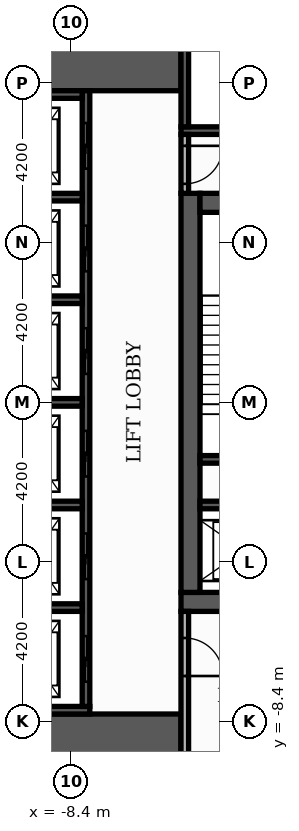
"""IFC4 building model, lengths in metres.
Left out: names, types, materials, properties, quantities, classifications, styles, units other than length and angle.
Written with IfcOpenShell. Run it as: python <this file> out.ifc"""

import sys

from ifc_helpers import new_model, si_unit, direction, frame, frame_2d, origin, place, context, subcontext, project, spatial, rectangle, extrude, element, fill, save


model = new_model("IFC4")
c1 = context("Model", 3, precision=1e-05, world=origin(), true_north=direction((0.0, 1.0)))
c2 = subcontext(c1, "Body", "Model", "MODEL_VIEW")
j1 = project(units=[si_unit("LENGTHUNIT", "METRE"), si_unit("PLANEANGLEUNIT", "RADIAN")], contexts=[c1])
p1 = place(None, origin())
s1 = spatial("IfcSite", under=j1, at=p1, CompositionType="ELEMENT")
p2 = place(p1, origin())
s2 = spatial("IfcBuilding", under=s1, at=p2, CompositionType="ELEMENT")
p3 = place(p2, frame((0.0, 0.0, -4.2)))
s3 = spatial("IfcBuildingStorey", under=s2, at=p3, CompositionType="ELEMENT", Elevation=-4.2)
p4 = place(p3, frame((-5.5, -5.25, 0.0), z_axis=(0.0, 0.0, 1.0), x_axis=(1.0, 0.0, 0.0)))
e1 = element("IfcWall", 1, at=p4, inside=s3, PredefinedType="SHEAR", context=c2, shape_type="SweptSolid", body=[
    extrude(rectangle(XDim=11.0, YDim=0.5, at=frame_2d((5.5, 0.0))), origin(), (0.0, 0.0, 1.0), 3.78),
])
p5 = place(p4, frame((4.9, 0.0, 0.0)))
e2 = element("IfcOpeningElement", 2, at=p5, cuts=e1, PredefinedType="OPENING", context=c2, shape_type="SweptSolid", body=[
    extrude(rectangle(XDim=1.2, YDim=2.1, at=frame_2d((0.6, 1.05))), frame((0.0, 0.26, 0.0), z_axis=(0.0, -1.0, 0.0), x_axis=(1.0, 0.0, 0.0)), (0.0, 0.0, 1.0), 0.52),
])
p6 = place(p3, frame((-5.25, -5.0, 0.0), z_axis=(0.0, 0.0, 1.0), x_axis=(0.0, 1.0, 0.0)))
e3 = element("IfcWall", 3, at=p6, inside=s3, PredefinedType="SHEAR", context=c2, shape_type="SweptSolid", body=[
    extrude(rectangle(XDim=10.5, YDim=0.5, at=frame_2d((5.25, 0.0))), origin(), (0.0, 0.0, 1.0), 3.78),
])
p7 = place(p3, frame((-5.0, 5.25, 0.0), z_axis=(0.0, 0.0, 1.0), x_axis=(1.0, 0.0, 0.0)))
e4 = element("IfcWall", 4, at=p7, inside=s3, PredefinedType="SHEAR", context=c2, shape_type="SweptSolid", body=[
    extrude(rectangle(XDim=10.0, YDim=0.5, at=frame_2d((5.0, 0.0))), origin(), (0.0, 0.0, 1.0), 3.78),
])
p8 = place(p7, frame((4.4, 0.0, 0.0)))
e5 = element("IfcOpeningElement", 5, at=p8, cuts=e4, PredefinedType="OPENING", context=c2, shape_type="SweptSolid", body=[
    extrude(rectangle(XDim=1.2, YDim=2.1, at=frame_2d((0.6, 1.05))), frame((0.0, 0.26, 0.0), z_axis=(0.0, -1.0, 0.0), x_axis=(1.0, 0.0, 0.0)), (0.0, 0.0, 1.0), 0.52),
])
for number, where, z_axis, x_axis in (
    (6, (-10.1, -9.15, 0.0), (0.0, 0.0, 1.0), (1.0, 0.0, 0.0)),
    (7, (-10.1, 9.15, 0.0), (0.0, 0.0, 1.0), (1.0, 0.0, 0.0)),
):
    element("IfcWall", number, at=place(p3, frame(where, z_axis=z_axis, x_axis=x_axis)), inside=s3, PredefinedType="SHEAR", context=c2, shape_type="SweptSolid", body=[
        extrude(rectangle(XDim=4.6, YDim=1.9, at=frame_2d((2.3, 0.0))), origin(), (0.0, 0.0, 1.0), 3.78),
    ])
p9 = place(p3, frame((-5.0, -1.5, 0.0), z_axis=(0.0, 0.0, 1.0), x_axis=(1.0, 0.0, 0.0)))
e8 = element("IfcWall", 8, at=p9, inside=s3, PredefinedType="SHEAR", context=c2, shape_type="SweptSolid", body=[
    extrude(rectangle(XDim=3.05, YDim=0.2, at=frame_2d((1.525, 0.0))), origin(), (0.0, 0.0, 1.0), 3.78),
])
p10 = place(p3, frame((-5.5, 7.15, 0.0), z_axis=(0.0, 0.0, 1.0), x_axis=(1.0, 0.0, 0.0)))
e9 = element("IfcWall", 9, at=p10, inside=s3, PredefinedType="SHEAR", context=c2, shape_type="SweptSolid", body=[
    extrude(rectangle(XDim=6.8, YDim=0.2, at=frame_2d((3.4, 0.0))), origin(), (0.0, 0.0, 1.0), 3.78),
])
p11 = place(p3, frame((-5.4, 7.25, 0.0), z_axis=(0.0, 0.0, 1.0), x_axis=(0.0, 1.0, 0.0)))
e10 = element("IfcWall", 10, at=p11, inside=s3, PredefinedType="SHEAR", context=c2, shape_type="SweptSolid", body=[
    extrude(rectangle(XDim=2.85, YDim=0.2, at=frame_2d((1.425, 0.0))), origin(), (0.0, 0.0, 1.0), 3.78),
])
p12 = place(p3, frame((-10.1, -8.1, 0.0), z_axis=(0.0, 0.0, 1.0), x_axis=(1.0, 0.0, 0.0)))
e11 = element("IfcWall", 11, at=p12, inside=s3, PredefinedType="SHEAR", context=c2, shape_type="SweptSolid", body=[
    extrude(rectangle(XDim=2.2, YDim=0.2, at=frame_2d((1.1, 0.0))), origin(), (0.0, 0.0, 1.0), 3.78),
])
p13 = place(p3, frame((-8.0, -8.0, 0.0), z_axis=(0.0, 0.0, 1.0), x_axis=(0.0, 1.0, 0.0)))
e12 = element("IfcWall", 12, at=p13, inside=s3, PredefinedType="SHEAR", context=c2, shape_type="SweptSolid", body=[
    extrude(rectangle(XDim=16.2, YDim=0.2, at=frame_2d((8.1, 0.0))), origin(), (0.0, 0.0, 1.0), 3.78),
])
p14 = place(p13, frame((0.65, 0.0, 0.0)))
e13 = element("IfcOpeningElement", 13, at=p14, cuts=e12, PredefinedType="OPENING", context=c2, shape_type="SweptSolid", body=[
    extrude(rectangle(XDim=1.2, YDim=2.1, at=frame_2d((0.6, 1.05))), frame((0.0, 0.11, 0.0), z_axis=(0.0, -1.0, 0.0), x_axis=(1.0, 0.0, 0.0)), (0.0, 0.0, 1.0), 0.22),
])
p15 = place(p13, frame((3.35, 0.0, 0.0)))
e14 = element("IfcOpeningElement", 14, at=p15, cuts=e12, PredefinedType="OPENING", context=c2, shape_type="SweptSolid", body=[
    extrude(rectangle(XDim=1.2, YDim=2.1, at=frame_2d((0.6, 1.05))), frame((0.0, 0.11, 0.0), z_axis=(0.0, -1.0, 0.0), x_axis=(1.0, 0.0, 0.0)), (0.0, 0.0, 1.0), 0.22),
])
p16 = place(p13, frame((6.05, 0.0, 0.0)))
e15 = element("IfcOpeningElement", 15, at=p16, cuts=e12, PredefinedType="OPENING", context=c2, shape_type="SweptSolid", body=[
    extrude(rectangle(XDim=1.2, YDim=2.1, at=frame_2d((0.6, 1.05))), frame((0.0, 0.11, 0.0), z_axis=(0.0, -1.0, 0.0), x_axis=(1.0, 0.0, 0.0)), (0.0, 0.0, 1.0), 0.22),
])
p17 = place(p13, frame((8.75, 0.0, 0.0)))
e16 = element("IfcOpeningElement", 16, at=p17, cuts=e12, PredefinedType="OPENING", context=c2, shape_type="SweptSolid", body=[
    extrude(rectangle(XDim=1.2, YDim=2.1, at=frame_2d((0.6, 1.05))), frame((0.0, 0.11, 0.0), z_axis=(0.0, -1.0, 0.0), x_axis=(1.0, 0.0, 0.0)), (0.0, 0.0, 1.0), 0.22),
])
p18 = place(p13, frame((11.45, 0.0, 0.0)))
e17 = element("IfcOpeningElement", 17, at=p18, cuts=e12, PredefinedType="OPENING", context=c2, shape_type="SweptSolid", body=[
    extrude(rectangle(XDim=1.2, YDim=2.1, at=frame_2d((0.6, 1.05))), frame((0.0, 0.11, 0.0), z_axis=(0.0, -1.0, 0.0), x_axis=(1.0, 0.0, 0.0)), (0.0, 0.0, 1.0), 0.22),
])
p19 = place(p13, frame((14.15, 0.0, 0.0)))
e18 = element("IfcOpeningElement", 18, at=p19, cuts=e12, PredefinedType="OPENING", context=c2, shape_type="SweptSolid", body=[
    extrude(rectangle(XDim=1.2, YDim=2.1, at=frame_2d((0.6, 1.05))), frame((0.0, 0.11, 0.0), z_axis=(0.0, -1.0, 0.0), x_axis=(1.0, 0.0, 0.0)), (0.0, 0.0, 1.0), 0.22),
])
for number, where, z_axis, x_axis in (
    (19, (-10.1, -5.4, 0.0), (0.0, 0.0, 1.0), (1.0, 0.0, 0.0)),
    (20, (-10.1, -2.7, 0.0), (0.0, 0.0, 1.0), (1.0, 0.0, 0.0)),
):
    element("IfcWall", number, at=place(p3, frame(where, z_axis=z_axis, x_axis=x_axis)), inside=s3, PredefinedType="SHEAR", context=c2, shape_type="SweptSolid", body=[
        extrude(rectangle(XDim=2.0, YDim=0.2, at=frame_2d((1.0, 0.0))), origin(), (0.0, 0.0, 1.0), 3.78),
    ])
p20 = place(p3, frame((-5.0, -2.7, 0.0), z_axis=(0.0, 0.0, 1.0), x_axis=(1.0, 0.0, 0.0)))
e21 = element("IfcWall", 21, at=p20, inside=s3, PredefinedType="SHEAR", context=c2, shape_type="SweptSolid", body=[
    extrude(rectangle(XDim=2.85, YDim=0.2, at=frame_2d((1.425, 0.0))), origin(), (0.0, 0.0, 1.0), 3.78),
])
for number, where, z_axis, x_axis in (
    (22, (-10.1, 0.0, 0.0), (0.0, 0.0, 1.0), (1.0, 0.0, 0.0)),
    (23, (-10.1, 2.7, 0.0), (0.0, 0.0, 1.0), (1.0, 0.0, 0.0)),
    (24, (-10.1, 5.4, 0.0), (0.0, 0.0, 1.0), (1.0, 0.0, 0.0)),
    (25, (-10.1, 8.1, 0.0), (0.0, 0.0, 1.0), (1.0, 0.0, 0.0)),
):
    element("IfcWall", number, at=place(p3, frame(where, z_axis=z_axis, x_axis=x_axis)), inside=s3, PredefinedType="SHEAR", context=c2, shape_type="SweptSolid", body=[
        extrude(rectangle(XDim=2.0, YDim=0.2, at=frame_2d((1.0, 0.0))), origin(), (0.0, 0.0, 1.0), 3.78),
    ])
p21 = place(p3, frame((-5.4, -10.1, 0.0), z_axis=(0.0, 0.0, 1.0), x_axis=(0.0, 1.0, 0.0)))
e26 = element("IfcWall", 26, at=p21, inside=s3, PredefinedType="PARTITIONING", context=c2, shape_type="SweptSolid", body=[
    extrude(rectangle(XDim=4.6, YDim=0.2, at=frame_2d((2.3, 0.0))), origin(), (0.0, 0.0, 1.0), 3.78),
])
p22 = place(p21, frame((2.9, 0.0, 0.0)))
e27 = element("IfcOpeningElement", 27, at=p22, cuts=e26, PredefinedType="OPENING", context=c2, shape_type="SweptSolid", body=[
    extrude(rectangle(XDim=1.0, YDim=2.1, at=frame_2d((0.5, 1.05))), frame((0.0, 0.11, 0.0), z_axis=(0.0, -1.0, 0.0), x_axis=(1.0, 0.0, 0.0)), (0.0, 0.0, 1.0), 0.22),
])
p23 = place(p3, frame((-5.4, 5.5, 0.0), z_axis=(0.0, 0.0, 1.0), x_axis=(0.0, 1.0, 0.0)))
e28 = element("IfcWall", 28, at=p23, inside=s3, PredefinedType="PARTITIONING", context=c2, shape_type="SweptSolid", body=[
    extrude(rectangle(XDim=1.55, YDim=0.2, at=frame_2d((0.775, 0.0))), origin(), (0.0, 0.0, 1.0), 3.78),
])
p24 = place(p23, frame((0.25, 0.0, 0.0)))
e29 = element("IfcOpeningElement", 29, at=p24, cuts=e28, PredefinedType="OPENING", context=c2, shape_type="SweptSolid", body=[
    extrude(rectangle(XDim=1.0, YDim=2.1, at=frame_2d((0.5, 1.05))), frame((0.0, 0.11, 0.0), z_axis=(0.0, -1.0, 0.0), x_axis=(1.0, 0.0, 0.0)), (0.0, 0.0, 1.0), 0.22),
])
p25 = place(p14, origin())
e30 = element("IfcDoor", 30, at=p25, inside=s3, OperationType="SLIDING_TO_LEFT", PredefinedType="DOOR", context=c2, shape_type="SweptSolid", body=[
    extrude(rectangle(XDim=1.2, YDim=2.1, at=frame_2d((0.6, 1.05))), frame((0.0, 0.025, 0.0), z_axis=(0.0, -1.0, 0.0), x_axis=(1.0, 0.0, 0.0)), (0.0, 0.0, 1.0), 0.05),
])
fill(e13, e30)
p26 = place(p15, origin())
e31 = element("IfcDoor", 31, at=p26, inside=s3, OperationType="SLIDING_TO_LEFT", PredefinedType="DOOR", context=c2, shape_type="SweptSolid", body=[
    extrude(rectangle(XDim=1.2, YDim=2.1, at=frame_2d((0.6, 1.05))), frame((0.0, 0.025, 0.0), z_axis=(0.0, -1.0, 0.0), x_axis=(1.0, 0.0, 0.0)), (0.0, 0.0, 1.0), 0.05),
])
fill(e14, e31)
p27 = place(p16, origin())
e32 = element("IfcDoor", 32, at=p27, inside=s3, OperationType="SLIDING_TO_LEFT", PredefinedType="DOOR", context=c2, shape_type="SweptSolid", body=[
    extrude(rectangle(XDim=1.2, YDim=2.1, at=frame_2d((0.6, 1.05))), frame((0.0, 0.025, 0.0), z_axis=(0.0, -1.0, 0.0), x_axis=(1.0, 0.0, 0.0)), (0.0, 0.0, 1.0), 0.05),
])
fill(e15, e32)
p28 = place(p17, origin())
e33 = element("IfcDoor", 33, at=p28, inside=s3, OperationType="SLIDING_TO_LEFT", PredefinedType="DOOR", context=c2, shape_type="SweptSolid", body=[
    extrude(rectangle(XDim=1.2, YDim=2.1, at=frame_2d((0.6, 1.05))), frame((0.0, 0.025, 0.0), z_axis=(0.0, -1.0, 0.0), x_axis=(1.0, 0.0, 0.0)), (0.0, 0.0, 1.0), 0.05),
])
fill(e16, e33)
p29 = place(p18, origin())
e34 = element("IfcDoor", 34, at=p29, inside=s3, OperationType="SLIDING_TO_LEFT", PredefinedType="DOOR", context=c2, shape_type="SweptSolid", body=[
    extrude(rectangle(XDim=1.2, YDim=2.1, at=frame_2d((0.6, 1.05))), frame((0.0, 0.025, 0.0), z_axis=(0.0, -1.0, 0.0), x_axis=(1.0, 0.0, 0.0)), (0.0, 0.0, 1.0), 0.05),
])
fill(e17, e34)
p30 = place(p19, origin())
e35 = element("IfcDoor", 35, at=p30, inside=s3, OperationType="SLIDING_TO_LEFT", PredefinedType="DOOR", context=c2, shape_type="SweptSolid", body=[
    extrude(rectangle(XDim=1.2, YDim=2.1, at=frame_2d((0.6, 1.05))), frame((0.0, 0.025, 0.0), z_axis=(0.0, -1.0, 0.0), x_axis=(1.0, 0.0, 0.0)), (0.0, 0.0, 1.0), 0.05),
])
fill(e18, e35)
p31 = place(p24, frame((1.0, 0.0, 0.0), z_axis=(0.0, 0.0, 1.0), x_axis=(-1.0, 0.0, 0.0)))
e36 = element("IfcDoor", 36, at=p31, inside=s3, OperationType="SINGLE_SWING_RIGHT", PredefinedType="DOOR", context=c2, shape_type="SweptSolid", body=[
    extrude(rectangle(XDim=1.0, YDim=2.1, at=frame_2d((0.5, 1.05))), frame((0.0, 0.025, 0.0), z_axis=(0.0, -1.0, 0.0), x_axis=(1.0, 0.0, 0.0)), (0.0, 0.0, 1.0), 0.05),
])
fill(e29, e36)
p32 = place(p22, frame((1.0, 0.0, 0.0), z_axis=(0.0, 0.0, 1.0), x_axis=(-1.0, 0.0, 0.0)))
e37 = element("IfcDoor", 37, at=p32, inside=s3, OperationType="SINGLE_SWING_LEFT", PredefinedType="DOOR", context=c2, shape_type="SweptSolid", body=[
    extrude(rectangle(XDim=1.0, YDim=2.1, at=frame_2d((0.5, 1.05))), frame((0.0, 0.025, 0.0), z_axis=(0.0, -1.0, 0.0), x_axis=(1.0, 0.0, 0.0)), (0.0, 0.0, 1.0), 0.05),
])
fill(e27, e37)
save(model, sys.argv[1])
